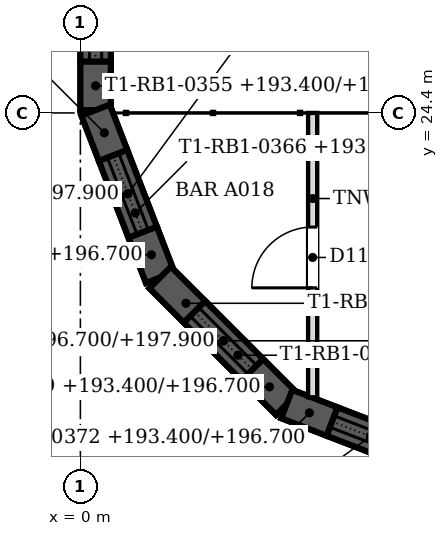
"""IFC4 building model, lengths in metres.
Left out: names, types, materials, properties, quantities, classifications, styles, units other than length and angle.
Written with IfcOpenShell. Run it as: python <this file> out.ifc"""

import sys

from ifc_helpers import new_model, si_unit, direction, frame, frame_2d, origin, place, context, subcontext, project, spatial, polyline, rectangle, outline, extrude, faceted_brep, source, transform, mapped, element, fill, save


model = new_model("IFC4")
c1 = context("Model", 3, precision=1e-05, world=origin(), true_north=direction((0.0, 1.0)))
c2 = subcontext(c1, "Body", "Model", "MODEL_VIEW")
j1 = project(units=[si_unit("LENGTHUNIT", "METRE"), si_unit("PLANEANGLEUNIT", "RADIAN")], contexts=[c1])
p1 = place(None, origin())
s1 = spatial("IfcSite", under=j1, at=p1, CompositionType="ELEMENT")
p2 = place(p1, origin())
s2 = spatial("IfcBuilding", under=s1, at=p2, CompositionType="ELEMENT")
p3 = place(p2, frame((0.0, 0.0, 193.4)))
s3 = spatial("IfcBuildingStorey", under=s2, at=p3, CompositionType="ELEMENT", Elevation=193.4)
m1 = source(origin(), c2, "Body", "Brep", [
    faceted_brep([(0.0, -0.25, 0.0), (0.8, -0.25, 0.0), (0.8, -0.25, 3.3), (0.0, -0.25, 3.3), (0.0, 0.25, 3.3), (0.753, 0.25, 3.3), (0.753, 0.25, 0.0), (0.0, 0.25, 0.0), (0.8, -0.0, 0.0), (0.8, -0.0, 3.3)], [[[0, 1, 2, 3]], [[4, 5, 6, 7]], [[7, 6, 8, 1, 0]], [[9, 2, 1, 8]], [[5, 4, 3, 2, 9]], [[4, 7, 0, 3]], [[8, 6, 5, 9]]]),
])
p4 = place(p3, frame((0.25, 25.247, 0.0), z_axis=(0.0, 0.0, 1.0), x_axis=(0.0, -1.0, 0.0)))
e1 = element("IfcWall", 1, at=p4, inside=s3, PredefinedType="SOLIDWALL", context=c2, shape_type="MappedRepresentation", body=[
    mapped(m1, transform((0.0, 0.0, 0.0), scale=1.0)),
])
m2 = source(origin(), c2, "Body", "SweptSolid", [
    extrude(outline(polyline([(0.0, 0.0), (4.453, 0.0), (4.453, 0.9), (0.0, 0.9), (0.0, 0.0)])), frame((0.0, 0.25, 0.0), z_axis=(0.0, -1.0, 0.0), x_axis=(1.0, 0.0, 0.0)), (0.0, 0.0, 1.0), 0.5),
])
p5 = place(p3, frame((0.25, 29.7, 0.0), z_axis=(0.0, 0.0, 1.0), x_axis=(0.0, -1.0, 0.0)))
e2 = element("IfcWall", 2, at=p5, inside=s3, PredefinedType="SOLIDWALL", context=c2, shape_type="MappedRepresentation", body=[
    mapped(m2, transform((0.0, 0.0, 0.0), scale=1.0)),
])
m3 = source(origin(), c2, "Body", "Brep", [
    faceted_brep([(0.0, -0.25, 0.0), (6.053, -0.25, 0.0), (6.053, -0.25, 1.2), (0.0, -0.25, 1.2), (0.0, 0.25, 1.2), (6.007, 0.25, 1.2), (6.007, 0.25, 0.0), (0.0, 0.25, 0.0), (6.053, 0.0, 0.0), (6.053, 0.0, 1.2)], [[[0, 1, 2, 3]], [[4, 5, 6, 7]], [[7, 6, 8, 1, 0]], [[9, 2, 1, 8]], [[5, 4, 3, 2, 9]], [[4, 7, 0, 3]], [[8, 6, 5, 9]]]),
])
p6 = place(p3, frame((0.25, 30.5, 3.3), z_axis=(0.0, 0.0, 1.0), x_axis=(0.0, -1.0, 0.0)))
e3 = element("IfcWall", 3, at=p6, inside=s3, PredefinedType="SOLIDWALL", context=c2, shape_type="MappedRepresentation", body=[
    mapped(m3, transform((0.0, 0.0, 0.0), scale=1.0)),
])
m4 = source(origin(), c2, "Body", "Brep", [
    faceted_brep([(0.0, -0.25, 0.0), (0.8, -0.25, 0.0), (0.8, -0.25, 3.3), (0.0, -0.25, 3.3), (0.047, 0.25, 3.3), (0.8, 0.25, 3.3), (0.8, 0.25, 0.0), (0.047, 0.25, 0.0), (0.0, 0.0, 0.0), (0.0, 0.0, 3.3)], [[[0, 1, 2, 3]], [[4, 5, 6, 7]], [[7, 6, 1, 0, 8]], [[5, 4, 9, 3, 2]], [[8, 0, 3, 9]], [[7, 8, 9, 4]], [[1, 6, 5, 2]]]),
])
p7 = place(p3, frame((0.25, 24.447, 0.0), z_axis=(0.0, 0.0, 1.0), x_axis=(0.3598379092, -0.93301483327, 0.0)))
e4 = element("IfcWall", 4, at=p7, inside=s3, PredefinedType="SOLIDWALL", context=c2, shape_type="MappedRepresentation", body=[
    mapped(m4, transform((0.0, 0.0, 0.0), scale=1.0)),
])
m5 = source(origin(), c2, "Body", "Brep", [
    faceted_brep([(0.0, -0.25, 0.0), (0.8, -0.25, 0.0), (0.8, -0.25, 3.3), (0.0, -0.25, 3.3), (0.0, 0.25, 3.3), (0.747, 0.25, 3.3), (0.747, 0.25, 0.0), (0.0, 0.25, 0.0), (0.8, -0.0, 0.0), (0.8, -0.0, 3.3)], [[[0, 1, 2, 3]], [[4, 5, 6, 7]], [[7, 6, 8, 1, 0]], [[9, 2, 1, 8]], [[5, 4, 3, 2, 9]], [[4, 7, 0, 3]], [[8, 6, 5, 9]]]),
])
p8 = place(p3, frame((1.024, 22.44, 0.0), z_axis=(0.0, 0.0, 1.0), x_axis=(0.360001058183, -0.932951894851, 0.0)))
e5 = element("IfcWall", 5, at=p8, inside=s3, PredefinedType="SOLIDWALL", context=c2, shape_type="MappedRepresentation", body=[
    mapped(m5, transform((0.0, 0.0, 0.0), scale=1.0)),
])
m6 = source(origin(), c2, "Body", "SweptSolid", [
    extrude(outline(polyline([(0.0, 0.0), (1.351, 0.0), (1.351, 0.9), (0.0, 0.9), (0.0, 0.0)])), frame((0.0, 0.25, 0.0), z_axis=(0.0, -1.0, 0.0), x_axis=(1.0, 0.0, 0.0)), (0.0, 0.0, 1.0), 0.5),
])
p9 = place(p3, frame((0.538, 23.7, 0.0), z_axis=(0.0, 0.0, 1.0), x_axis=(0.359923772835, -0.932981713512, 0.0)))
e6 = element("IfcWall", 6, at=p9, inside=s3, PredefinedType="SOLIDWALL", context=c2, shape_type="MappedRepresentation", body=[
    mapped(m6, transform((0.0, 0.0, 0.0), scale=1.0)),
])
m7 = source(origin(), c2, "Body", "Brep", [
    faceted_brep([(0.0, -0.25, 0.0), (2.95, -0.25, 0.0), (2.95, -0.25, 1.2), (0.0, -0.25, 1.2), (0.047, 0.25, 1.2), (2.898, 0.25, 1.2), (2.898, 0.25, 0.0), (0.047, 0.25, 0.0), (2.95, 0.0, 0.0), (0.0, 0.0, 0.0), (2.95, 0.0, 1.2), (0.0, 0.0, 1.2)], [[[0, 1, 2, 3]], [[4, 5, 6, 7]], [[7, 6, 8, 1, 0, 9]], [[10, 2, 1, 8]], [[5, 4, 11, 3, 2, 10]], [[9, 0, 3, 11]], [[7, 9, 11, 4]], [[8, 6, 5, 10]]]),
])
p10 = place(p3, frame((0.25, 24.447, 3.3), z_axis=(0.0, 0.0, 1.0), x_axis=(0.359877213415, -0.932999673775, 0.0)))
e7 = element("IfcWall", 7, at=p10, inside=s3, PredefinedType="SOLIDWALL", context=c2, shape_type="MappedRepresentation", body=[
    mapped(m7, transform((0.0, 0.0, 0.0), scale=1.0)),
])
m8 = source(origin(), c2, "Body", "Brep", [
    faceted_brep([(0.0, -0.25, 0.0), (0.8, -0.25, 0.0), (0.8, -0.25, 3.3), (0.0, -0.25, 3.3), (0.053, 0.25, 3.3), (0.8, 0.25, 3.3), (0.8, 0.25, 0.0), (0.053, 0.25, 0.0), (0.0, 0.0, 0.0), (0.0, 0.0, 3.3)], [[[0, 1, 2, 3]], [[4, 5, 6, 7]], [[7, 6, 1, 0, 8]], [[5, 4, 9, 3, 2]], [[8, 0, 3, 9]], [[7, 8, 9, 4]], [[1, 6, 5, 2]]]),
])
p11 = place(p3, frame((1.312, 21.694, 0.0), z_axis=(0.0, 0.0, 1.0), x_axis=(0.706954206636, -0.707259322823, 0.0)))
e8 = element("IfcWall", 8, at=p11, inside=s3, PredefinedType="SOLIDWALL", context=c2, shape_type="MappedRepresentation", body=[
    mapped(m8, transform((0.0, 0.0, 0.0), scale=1.0)),
])
m9 = source(origin(), c2, "Body", "Brep", [
    faceted_brep([(0.0, -0.25, 0.0), (0.8, -0.25, 0.0), (0.8, -0.25, 3.3), (0.0, -0.25, 3.3), (0.0, 0.25, 3.3), (0.747, 0.25, 3.3), (0.747, 0.25, 0.0), (0.0, 0.25, 0.0), (0.8, -0.0, 0.0), (0.8, -0.0, 3.3)], [[[0, 1, 2, 3]], [[4, 5, 6, 7]], [[7, 6, 8, 1, 0]], [[9, 2, 1, 8]], [[5, 4, 3, 2, 9]], [[4, 7, 0, 3]], [[8, 6, 5, 9]]]),
])
p12 = place(p3, frame((2.828, 20.177, 0.0), z_axis=(0.0, 0.0, 1.0), x_axis=(0.707106781187, -0.707106781187, 0.0)))
e9 = element("IfcWall", 9, at=p12, inside=s3, PredefinedType="SOLIDWALL", context=c2, shape_type="MappedRepresentation", body=[
    mapped(m9, transform((0.0, 0.0, 0.0), scale=1.0)),
])
m10 = source(origin(), c2, "Body", "SweptSolid", [
    extrude(outline(polyline([(0.0, 0.0), (1.344, 0.0), (1.344, 0.9), (0.0, 0.9), (0.0, 0.0)])), frame((0.0, 0.25, 0.0), z_axis=(0.0, -1.0, 0.0), x_axis=(1.0, 0.0, 0.0)), (0.0, 0.0, 1.0), 0.5),
])
p13 = place(p3, frame((1.878, 21.128, 0.0), z_axis=(0.0, 0.0, 1.0), x_axis=(0.707106781187, -0.707106781187, 0.0)))
e10 = element("IfcWall", 10, at=p13, inside=s3, PredefinedType="SOLIDWALL", context=c2, shape_type="MappedRepresentation", body=[
    mapped(m10, transform((0.0, 0.0, 0.0), scale=1.0)),
])
m11 = source(origin(), c2, "Body", "Brep", [
    faceted_brep([(0.0, -0.25, 0.0), (2.944, -0.25, 0.0), (2.944, -0.25, 1.2), (0.0, -0.25, 1.2), (0.053, 0.25, 1.2), (2.891, 0.25, 1.2), (2.891, 0.25, 0.0), (0.053, 0.25, 0.0), (2.944, 0.0, 0.0), (0.0, 0.0, 0.0), (2.944, 0.0, 1.2), (0.0, 0.0, 1.2)], [[[0, 1, 2, 3]], [[4, 5, 6, 7]], [[7, 6, 8, 1, 0, 9]], [[10, 2, 1, 8]], [[5, 4, 11, 3, 2, 10]], [[9, 0, 3, 11]], [[7, 9, 11, 4]], [[8, 6, 5, 10]]]),
])
p14 = place(p3, frame((1.312, 21.694, 3.3), z_axis=(0.0, 0.0, 1.0), x_axis=(0.707106781187, -0.707106781187, 0.0)))
e11 = element("IfcWall", 11, at=p14, inside=s3, PredefinedType="SOLIDWALL", context=c2, shape_type="MappedRepresentation", body=[
    mapped(m11, transform((0.0, 0.0, 0.0), scale=1.0)),
])
m12 = source(origin(), c2, "Body", "Brep", [
    faceted_brep([(0.0, -0.25, 0.0), (0.8, -0.25, 0.0), (0.8, -0.25, 3.3), (0.0, -0.25, 3.3), (0.053, 0.25, 3.3), (0.8, 0.25, 3.3), (0.8, 0.25, 0.0), (0.053, 0.25, 0.0), (0.0, 0.0, 0.0), (0.0, 0.0, 3.3)], [[[0, 1, 2, 3]], [[4, 5, 6, 7]], [[7, 6, 1, 0, 8]], [[5, 4, 9, 3, 2]], [[8, 0, 3, 9]], [[7, 8, 9, 4]], [[1, 6, 5, 2]]]),
])
p15 = place(p3, frame((3.394, 19.612, 0.0), z_axis=(0.0, 0.0, 1.0), x_axis=(0.93301483327, -0.3598379092, 0.0)))
e12 = element("IfcWall", 12, at=p15, inside=s3, PredefinedType="SOLIDWALL", context=c2, shape_type="MappedRepresentation", body=[
    mapped(m12, transform((0.0, 0.0, 0.0), scale=1.0)),
])
p16 = place(p3, frame((4.14, 19.324, 0.0), z_axis=(0.0, 0.0, 1.0), x_axis=(0.932981713512, -0.359923772835, 0.0)))
e13 = element("IfcWall", 13, at=p16, inside=s3, PredefinedType="SOLIDWALL", context=c2, shape_type="MappedRepresentation", body=[
    mapped(m6, transform((0.0, 0.0, 0.0), scale=1.0)),
])
m13 = source(origin(), c2, "Body", "Brep", [
    faceted_brep([(0.0, -0.25, 0.0), (2.95, -0.25, 0.0), (2.95, -0.25, 1.2), (0.0, -0.25, 1.2), (0.053, 0.25, 1.2), (2.904, 0.25, 1.2), (2.904, 0.25, 0.0), (0.053, 0.25, 0.0), (2.95, 0.0, 0.0), (0.0, 0.0, 0.0), (2.95, 0.0, 1.2), (0.0, 0.0, 1.2)], [[[0, 1, 2, 3]], [[4, 5, 6, 7]], [[7, 6, 8, 1, 0, 9]], [[10, 2, 1, 8]], [[5, 4, 11, 3, 2, 10]], [[9, 0, 3, 11]], [[7, 9, 11, 4]], [[8, 6, 5, 10]]]),
])
p17 = place(p3, frame((3.394, 19.612, 3.3), z_axis=(0.0, 0.0, 1.0), x_axis=(0.932999673775, -0.359877213415, 0.0)))
e14 = element("IfcWall", 14, at=p17, inside=s3, PredefinedType="SOLIDWALL", context=c2, shape_type="MappedRepresentation", body=[
    mapped(m13, transform((0.0, 0.0, 0.0), scale=1.0)),
])
p18 = place(p3, frame((3.82, 19.723, 0.0), z_axis=(0.0, 0.0, 1.0), x_axis=(0.0, 1.0, 0.0)))
e15 = element("IfcWall", 15, at=p18, inside=s3, PredefinedType="PARTITIONING", context=c2, shape_type="SweptSolid", body=[
    extrude(rectangle(XDim=4.677, YDim=0.15, at=frame_2d((2.338, 0.0))), origin(), (0.0, 0.0, 1.0), 3.767),
])
m14 = source(origin(), c2, "Body", "SweptSolid", [
    extrude(rectangle(XDim=1.0, YDim=2.1, at=frame_2d((0.5, 1.05))), frame((0.0, 0.085, 0.0), z_axis=(0.0, -1.0, 0.0), x_axis=(1.0, 0.0, 0.0)), (0.0, 0.0, 1.0), 0.17),
])
p19 = place(p18, frame((1.8, 0.0, 0.0)))
e16 = element("IfcOpeningElement", 16, at=p19, cuts=e15, PredefinedType="OPENING", context=c2, shape_type="MappedRepresentation", body=[
    mapped(m14, transform((0.0, 0.0, 0.0), scale=1.0)),
])
m15 = source(origin(), c2, "Body", "SweptSolid", [
    extrude(rectangle(XDim=1.0, YDim=2.1, at=frame_2d((0.5, 1.05))), frame((0.0, 0.025, 0.0), z_axis=(0.0, -1.0, 0.0), x_axis=(1.0, 0.0, 0.0)), (0.0, 0.0, 1.0), 0.05),
])
p20 = place(p19, origin())
e17 = element("IfcDoor", 17, at=p20, inside=s3, OperationType="SINGLE_SWING_LEFT", PredefinedType="DOOR", context=c2, shape_type="MappedRepresentation", body=[
    mapped(m15, transform((0.0, 0.0, 0.0), scale=1.0)),
])
fill(e16, e17)
save(model, sys.argv[1])
